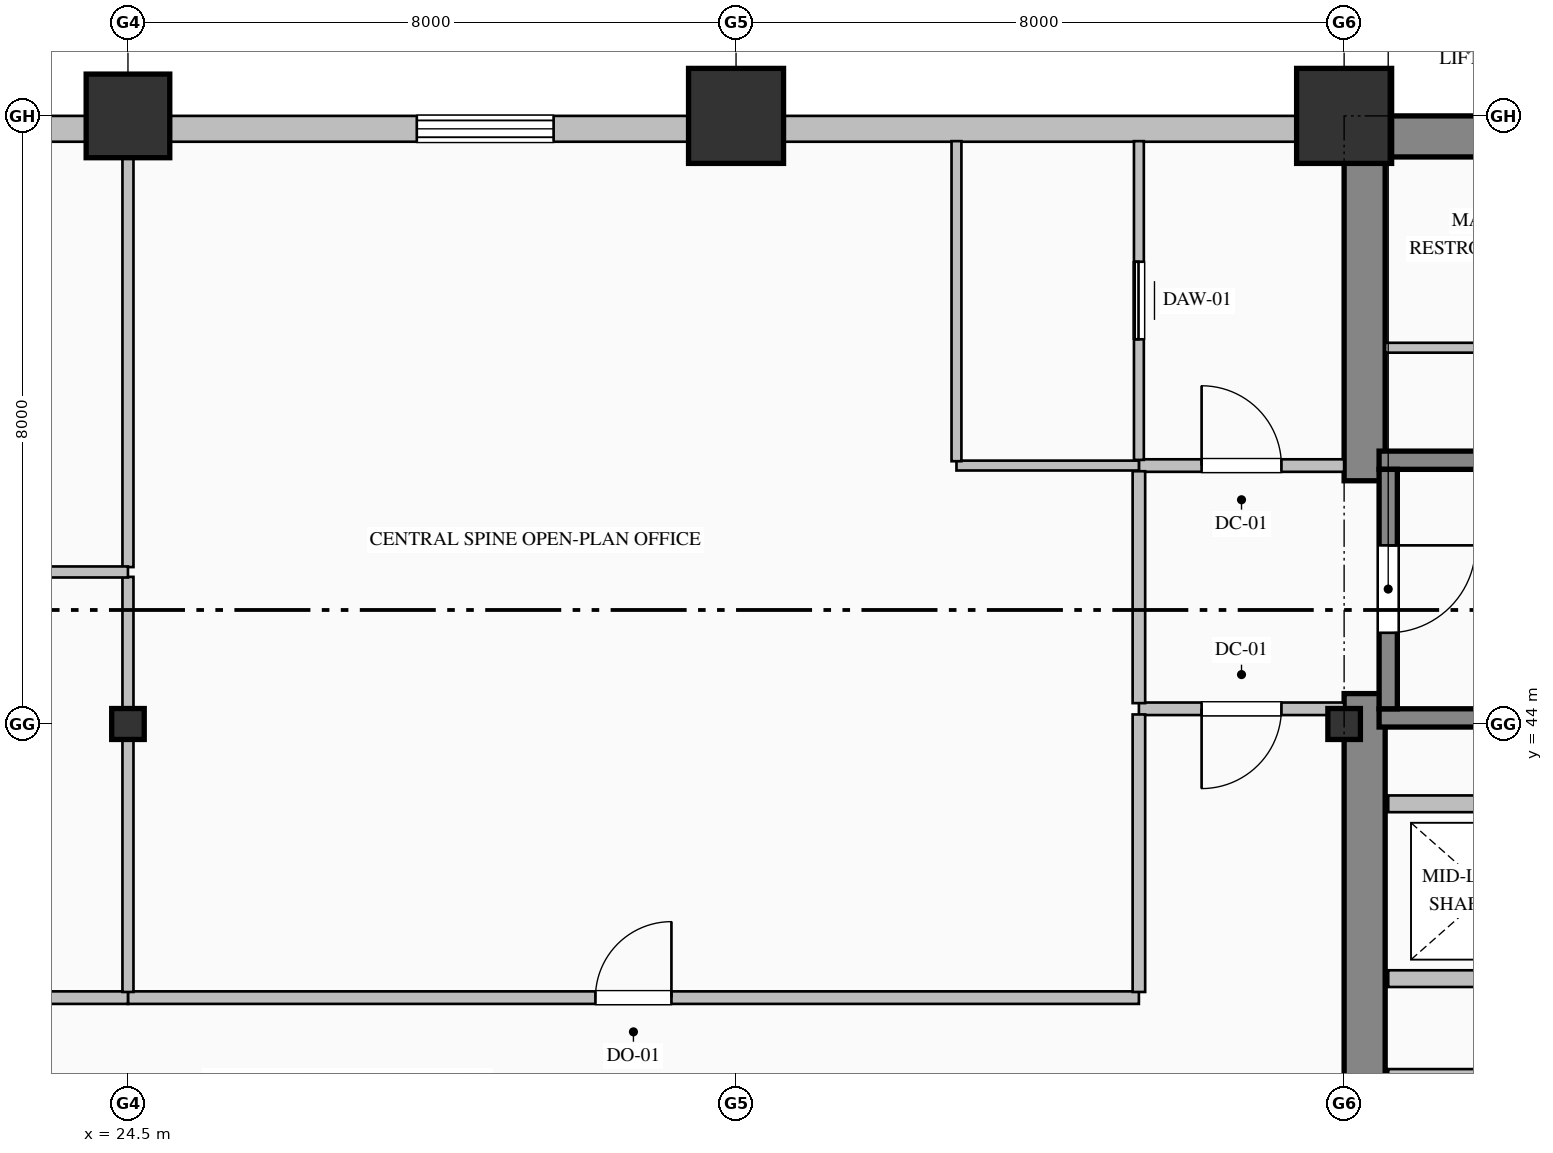
"""IFC4 building model, lengths in metres.
Left out: names, types, materials, properties, quantities, classifications, styles, units other than length and angle.
Written with IfcOpenShell. Run it as: python <this file> out.ifc"""

import sys

from ifc_helpers import new_model, si_unit, direction, frame, frame_2d, origin, origin_2d, place, context, subcontext, project, spatial, rectangle, hollow_rectangle, i_section, extrude, element, fill, save


model = new_model("IFC4")
c1 = context("Model", 3, precision=1e-05, world=origin(), true_north=direction((0.0, 1.0)))
c2 = subcontext(c1, "Body", "Model", "MODEL_VIEW")
j1 = project(units=[si_unit("LENGTHUNIT", "METRE"), si_unit("PLANEANGLEUNIT", "RADIAN")], contexts=[c1])
p1 = place(None, origin())
s1 = spatial("IfcSite", under=j1, at=p1, CompositionType="ELEMENT")
p2 = place(p1, origin())
s2 = spatial("IfcBuilding", under=s1, at=p2, CompositionType="ELEMENT")
p3 = place(p2, frame((0.0, 0.0, 68.2)))
s3 = spatial("IfcBuildingStorey", under=s2, at=p3, CompositionType="ELEMENT", Elevation=68.2)
p4 = place(p3, frame((40.5, 51.73, 0.0), z_axis=(0.0, 0.0, 1.0), x_axis=(1.0, 0.0, 0.0)))
e1 = element("IfcWall", 1, at=p4, inside=s3, PredefinedType="SHEAR", context=c2, shape_type="SweptSolid", body=[
    extrude(rectangle(XDim=23.5, YDim=0.54, at=frame_2d((11.75, 0.0))), origin(), (0.0, 0.0, 1.0), 3.75),
])
p5 = place(p3, frame((40.77, 36.54, 0.0), z_axis=(0.0, 0.0, 1.0), x_axis=(0.0, 1.0, 0.0)))
e2 = element("IfcWall", 2, at=p5, inside=s3, PredefinedType="SHEAR", context=c2, shape_type="SweptSolid", body=[
    extrude(rectangle(XDim=7.86, YDim=0.54, at=frame_2d((3.93, 0.0))), origin(), (0.0, 0.0, 1.0), 3.75),
])
p6 = place(p3, frame((40.77, 47.2, 0.0), z_axis=(0.0, 0.0, 1.0), x_axis=(0.0, 1.0, 0.0)))
e3 = element("IfcWall", 3, at=p6, inside=s3, PredefinedType="SHEAR", context=c2, shape_type="SweptSolid", body=[
    extrude(rectangle(XDim=4.26, YDim=0.54, at=frame_2d((2.13, 0.0))), origin(), (0.0, 0.0, 1.0), 3.75),
])
p7 = place(p3, frame((24.5, 44.0, 0.0), z_axis=(0.0, 0.0, 1.0), x_axis=(1.0, 0.0, 0.0)))
e4 = element("IfcColumn", 4, at=p7, inside=s3, PredefinedType="COLUMN", context=c2, shape_type="SweptSolid", body=[
    extrude(i_section(OverallWidth=0.407, OverallDepth=0.428, WebThickness=0.02, FlangeThickness=0.035, FilletRadius=0.022, at=origin_2d()), origin(), (0.0, 0.0, 1.0), 4.0),
])
p8 = place(p3, frame((24.5, 52.0, 0.0), z_axis=(0.0, 0.0, 1.0), x_axis=(1.0, 0.0, 0.0)))
e5 = element("IfcColumn", 5, at=p8, inside=s3, PredefinedType="COLUMN", context=c2, shape_type="SweptSolid", body=[
    extrude(hollow_rectangle(XDim=1.1, YDim=1.1, WallThickness=0.04, at=origin_2d()), origin(), (0.0, 0.0, 1.0), 4.0),
])
p9 = place(p3, frame((32.5, 52.0, 0.0), z_axis=(0.0, 0.0, 1.0), x_axis=(1.0, 0.0, 0.0)))
e6 = element("IfcColumn", 6, at=p9, inside=s3, PredefinedType="COLUMN", context=c2, shape_type="SweptSolid", body=[
    extrude(hollow_rectangle(XDim=1.25, YDim=1.25, WallThickness=0.045, at=origin_2d()), origin(), (0.0, 0.0, 1.0), 4.0),
])
p10 = place(p3, frame((40.5, 44.0, 0.0), z_axis=(0.0, 0.0, 1.0), x_axis=(1.0, 0.0, 0.0)))
e7 = element("IfcColumn", 7, at=p10, inside=s3, PredefinedType="COLUMN", context=c2, shape_type="SweptSolid", body=[
    extrude(i_section(OverallWidth=0.407, OverallDepth=0.428, WebThickness=0.02, FlangeThickness=0.035, FilletRadius=0.022, at=origin_2d()), origin(), (0.0, 0.0, 1.0), 4.0),
])
p11 = place(p3, frame((40.5, 52.0, 0.0), z_axis=(0.0, 0.0, 1.0), x_axis=(1.0, 0.0, 0.0)))
e8 = element("IfcColumn", 8, at=p11, inside=s3, PredefinedType="COLUMN", context=c2, shape_type="SweptSolid", body=[
    extrude(hollow_rectangle(XDim=1.25, YDim=1.25, WallThickness=0.045, at=origin_2d()), origin(), (0.0, 0.0, 1.0), 4.0),
])
p12 = place(p3, frame((4.0, 51.83, 0.0), z_axis=(0.0, 0.0, 1.0), x_axis=(1.0, 0.0, 0.0)))
e9 = element("IfcWall", 9, at=p12, inside=s3, PredefinedType="SOLIDWALL", context=c2, shape_type="SweptSolid", body=[
    extrude(rectangle(XDim=36.52, YDim=0.34, at=frame_2d((18.26, 0.0))), origin(), (0.0, 0.0, 1.0), 3.25),
])
p13 = place(p12, frame((6.15, 0.0, 0.85)))
e10 = element("IfcOpeningElement", 10, at=p13, cuts=e9, PredefinedType="OPENING", context=c2, shape_type="SweptSolid", body=[
    extrude(rectangle(XDim=2.1, YDim=2.05, at=frame_2d((1.05, 1.025))), frame((0.0, 0.18, 0.0), z_axis=(0.0, -1.0, 0.0), x_axis=(1.0, 0.0, 0.0)), (0.0, 0.0, 1.0), 0.36),
])
p14 = place(p12, frame((13.5, 0.0, 0.85)))
e11 = element("IfcOpeningElement", 11, at=p14, cuts=e9, PredefinedType="OPENING", context=c2, shape_type="SweptSolid", body=[
    extrude(rectangle(XDim=1.8, YDim=2.05, at=frame_2d((0.9, 1.025))), frame((0.0, 0.18, 0.0), z_axis=(0.0, -1.0, 0.0), x_axis=(1.0, 0.0, 0.0)), (0.0, 0.0, 1.0), 0.36),
])
p15 = place(p12, frame((16.95, 0.0, 0.85)))
e12 = element("IfcOpeningElement", 12, at=p15, cuts=e9, PredefinedType="OPENING", context=c2, shape_type="SweptSolid", body=[
    extrude(rectangle(XDim=2.1, YDim=2.05, at=frame_2d((1.05, 1.025))), frame((0.0, 0.18, 0.0), z_axis=(0.0, -1.0, 0.0), x_axis=(1.0, 0.0, 0.0)), (0.0, 0.0, 1.0), 0.36),
])
p16 = place(p12, frame((24.3, 0.0, 0.85)))
e13 = element("IfcOpeningElement", 13, at=p16, cuts=e9, PredefinedType="OPENING", context=c2, shape_type="SweptSolid", body=[
    extrude(rectangle(XDim=1.8, YDim=2.05, at=frame_2d((0.9, 1.025))), frame((0.0, 0.18, 0.0), z_axis=(0.0, -1.0, 0.0), x_axis=(1.0, 0.0, 0.0)), (0.0, 0.0, 1.0), 0.36),
])
for number, where, z_axis, x_axis in (
    (14, (40.96, 47.47, 0.0), (0.0, 0.0, 1.0), (1.0, 0.0, 0.0)),
    (15, (49.04, 44.08, 0.0), (0.0, 0.0, 1.0), (-1.0, 0.0, 0.0)),
):
    element("IfcWall", number, at=place(p3, frame(where, z_axis=z_axis, x_axis=x_axis)), inside=s3, PredefinedType="SOLIDWALL", context=c2, shape_type="SweptSolid", body=[
        extrude(rectangle(XDim=8.08, YDim=0.24, at=frame_2d((4.04, 0.0))), origin(), (0.0, 0.0, 1.0), 4.0),
    ])
p17 = place(p3, frame((41.08, 47.35, 0.0), z_axis=(0.0, 0.0, 1.0), x_axis=(0.0, -1.0, 0.0)))
e16 = element("IfcWall", 16, at=p17, inside=s3, PredefinedType="SOLIDWALL", context=c2, shape_type="SweptSolid", body=[
    extrude(rectangle(XDim=3.15, YDim=0.24, at=frame_2d((1.575, 0.0))), origin(), (0.0, 0.0, 1.0), 4.0),
])
p18 = place(p17, frame((1.0, 0.0, 0.0)))
e17 = element("IfcOpeningElement", 17, at=p18, cuts=e16, PredefinedType="OPENING", context=c2, shape_type="SweptSolid", body=[
    extrude(rectangle(XDim=1.15, YDim=2.2, at=frame_2d((0.575, 1.1))), frame((0.0, 0.13, 0.0), z_axis=(0.0, -1.0, 0.0), x_axis=(1.0, 0.0, 0.0)), (0.0, 0.0, 1.0), 0.26),
])
for number, where, z_axis, x_axis in (
    (18, (41.08, 39.35, 0.0), (0.0, 0.0, 1.0), (1.0, 0.0, 0.0)),
    (19, (49.32, 40.65, 0.0), (0.0, 0.0, 1.0), (-1.0, 0.0, 0.0)),
    (20, (41.08, 42.95, 0.0), (0.0, 0.0, 1.0), (1.0, 0.0, 0.0)),
):
    element("IfcWall", number, at=place(p3, frame(where, z_axis=z_axis, x_axis=x_axis)), inside=s3, PredefinedType="PARTITIONING", context=c2, shape_type="SweptSolid", body=[
        extrude(rectangle(XDim=8.24, YDim=0.22, at=frame_2d((4.12, 0.0))), origin(), (0.0, 0.0, 1.0), 3.75),
    ])
p19 = place(p3, frame((37.8, 47.4, 0.0), z_axis=(0.0, 0.0, 1.0), x_axis=(1.0, 0.0, 0.0)))
e21 = element("IfcWall", 21, at=p19, inside=s3, PredefinedType="PARTITIONING", context=c2, shape_type="SweptSolid", body=[
    extrude(rectangle(XDim=2.7, YDim=0.165, at=frame_2d((1.35, 0.0))), origin(), (0.0, 0.0, 1.0), 3.75),
])
p20 = place(p19, frame((0.825, 0.0, 0.0)))
e22 = element("IfcOpeningElement", 22, at=p20, cuts=e21, PredefinedType="OPENING", context=c2, shape_type="SweptSolid", body=[
    extrude(rectangle(XDim=1.05, YDim=2.15, at=frame_2d((0.525, 1.075))), frame((0.0, 0.093, 0.0), z_axis=(0.0, -1.0, 0.0), x_axis=(1.0, 0.0, 0.0)), (0.0, 0.0, 1.0), 0.185),
])
p21 = place(p3, frame((40.5, 44.2, 0.0), z_axis=(0.0, 0.0, 1.0), x_axis=(-1.0, 0.0, 0.0)))
e23 = element("IfcWall", 23, at=p21, inside=s3, PredefinedType="PARTITIONING", context=c2, shape_type="SweptSolid", body=[
    extrude(rectangle(XDim=2.7, YDim=0.165, at=frame_2d((1.35, 0.0))), origin(), (0.0, 0.0, 1.0), 3.75),
])
p22 = place(p21, frame((0.825, 0.0, 0.0)))
e24 = element("IfcOpeningElement", 24, at=p22, cuts=e23, PredefinedType="OPENING", context=c2, shape_type="SweptSolid", body=[
    extrude(rectangle(XDim=1.05, YDim=2.15, at=frame_2d((0.525, 1.075))), frame((0.0, 0.093, 0.0), z_axis=(0.0, -1.0, 0.0), x_axis=(1.0, 0.0, 0.0)), (0.0, 0.0, 1.0), 0.185),
])
p23 = place(p3, frame((37.8, 44.274, 0.0), z_axis=(0.0, 0.0, 1.0), x_axis=(0.0, 1.0, 0.0)))
e25 = element("IfcWall", 25, at=p23, inside=s3, PredefinedType="PARTITIONING", context=c2, shape_type="SweptSolid", body=[
    extrude(rectangle(XDim=3.051, YDim=0.165, at=frame_2d((1.525, 0.0))), origin(), (0.0, 0.0, 1.0), 3.75),
])
p24 = place(p3, frame((37.8, 47.475, 0.0), z_axis=(0.0, 0.0, 1.0), x_axis=(0.0, 1.0, 0.0)))
e26 = element("IfcWall", 26, at=p24, inside=s3, PredefinedType="PARTITIONING", context=c2, shape_type="SweptSolid", body=[
    extrude(rectangle(XDim=4.193, YDim=0.13, at=frame_2d((2.097, 0.0))), origin(), (0.0, 0.0, 1.0), 3.75),
])
p25 = place(p24, frame((1.587, 0.0, 0.0)))
e27 = element("IfcOpeningElement", 27, at=p25, cuts=e26, PredefinedType="OPENING", context=c2, shape_type="SweptSolid", body=[
    extrude(rectangle(XDim=1.02, YDim=2.15, at=frame_2d((0.51, 1.075))), frame((0.0, 0.075, 0.0), z_axis=(0.0, -1.0, 0.0), x_axis=(1.0, 0.0, 0.0)), (0.0, 0.0, 1.0), 0.15),
])
p26 = place(p3, frame((37.8, 47.4, 0.0), z_axis=(0.0, 0.0, 1.0), x_axis=(-1.0, 0.0, 0.0)))
e28 = element("IfcWall", 28, at=p26, inside=s3, PredefinedType="PARTITIONING", context=c2, shape_type="SweptSolid", body=[
    extrude(rectangle(XDim=2.4, YDim=0.13, at=frame_2d((1.2, 0.0))), origin(), (0.0, 0.0, 1.0), 3.75),
])
p27 = place(p3, frame((35.4, 47.457, 0.0), z_axis=(0.0, 0.0, 1.0), x_axis=(0.0, 1.0, 0.0)))
e29 = element("IfcWall", 29, at=p27, inside=s3, PredefinedType="PARTITIONING", context=c2, shape_type="SweptSolid", body=[
    extrude(rectangle(XDim=4.211, YDim=0.13, at=frame_2d((2.105, 0.0))), origin(), (0.0, 0.0, 1.0), 3.75),
])
p28 = place(p3, frame((41.04, 48.95, 0.0), z_axis=(0.0, 0.0, 1.0), x_axis=(1.0, 0.0, 0.0)))
e30 = element("IfcWall", 30, at=p28, inside=s3, PredefinedType="PARTITIONING", context=c2, shape_type="SweptSolid", body=[
    extrude(rectangle(XDim=4.16, YDim=0.13, at=frame_2d((2.08, 0.0))), origin(), (0.0, 0.0, 1.0), 3.75),
])
p29 = place(p28, frame((1.62, 0.0, 0.0)))
e31 = element("IfcOpeningElement", 31, at=p29, cuts=e30, PredefinedType="OPENING", context=c2, shape_type="SweptSolid", body=[
    extrude(rectangle(XDim=0.92, YDim=2.15, at=frame_2d((0.46, 1.075))), frame((0.0, 0.075, 0.0), z_axis=(0.0, -1.0, 0.0), x_axis=(1.0, 0.0, 0.0)), (0.0, 0.0, 1.0), 0.15),
])
p30 = place(p3, frame((24.5, 40.4, 0.0), z_axis=(0.0, 0.0, 1.0), x_axis=(1.0, 0.0, 0.0)))
e32 = element("IfcWall", 32, at=p30, inside=s3, PredefinedType="PARTITIONING", context=c2, shape_type="SweptSolid", body=[
    extrude(rectangle(XDim=13.3, YDim=0.165, at=frame_2d((6.65, 0.0))), origin(), (0.0, 0.0, 1.0), 3.75),
])
p31 = place(p30, frame((6.15, 0.0, 0.0)))
e33 = element("IfcOpeningElement", 33, at=p31, cuts=e32, PredefinedType="OPENING", context=c2, shape_type="SweptSolid", body=[
    extrude(rectangle(XDim=1.0, YDim=2.15, at=frame_2d((0.5, 1.075))), frame((0.0, 0.093, 0.0), z_axis=(0.0, -1.0, 0.0), x_axis=(1.0, 0.0, 0.0)), (0.0, 0.0, 1.0), 0.185),
])
p32 = place(p3, frame((9.0, 40.4, 0.0), z_axis=(0.0, 0.0, 1.0), x_axis=(1.0, 0.0, 0.0)))
e34 = element("IfcWall", 34, at=p32, inside=s3, PredefinedType="PARTITIONING", context=c2, shape_type="SweptSolid", body=[
    extrude(rectangle(XDim=15.5, YDim=0.165, at=frame_2d((7.75, 0.0))), origin(), (0.0, 0.0, 1.0), 3.75),
])
p33 = place(p32, frame((7.25, 0.0, 0.0)))
e35 = element("IfcOpeningElement", 35, at=p33, cuts=e34, PredefinedType="OPENING", context=c2, shape_type="SweptSolid", body=[
    extrude(rectangle(XDim=1.0, YDim=2.15, at=frame_2d((0.5, 1.075))), frame((0.0, 0.093, 0.0), z_axis=(0.0, -1.0, 0.0), x_axis=(1.0, 0.0, 0.0)), (0.0, 0.0, 1.0), 0.185),
])
p34 = place(p3, frame((37.8, 40.475, 0.0), z_axis=(0.0, 0.0, 1.0), x_axis=(0.0, 1.0, 0.0)))
e36 = element("IfcWall", 36, at=p34, inside=s3, PredefinedType="PARTITIONING", context=c2, shape_type="SweptSolid", body=[
    extrude(rectangle(XDim=3.651, YDim=0.165, at=frame_2d((1.825, 0.0))), origin(), (0.0, 0.0, 1.0), 3.75),
])
p35 = place(p3, frame((24.5, 40.475, 0.0), z_axis=(0.0, 0.0, 1.0), x_axis=(0.0, 1.0, 0.0)))
e37 = element("IfcWall", 37, at=p35, inside=s3, PredefinedType="PARTITIONING", context=c2, shape_type="SweptSolid", body=[
    extrude(rectangle(XDim=5.461, YDim=0.145, at=frame_2d((2.73, 0.0))), origin(), (0.0, 0.0, 1.0), 3.042),
])
p36 = place(p3, frame((24.5, 46.064, 0.0), z_axis=(0.0, 0.0, 1.0), x_axis=(0.0, 1.0, 0.0)))
e38 = element("IfcWall", 38, at=p36, inside=s3, PredefinedType="PARTITIONING", context=c2, shape_type="SweptSolid", body=[
    extrude(rectangle(XDim=5.604, YDim=0.145, at=frame_2d((2.802, 0.0))), origin(), (0.0, 0.0, 1.0), 3.042),
])
p37 = place(p3, frame((0.332, 46.0, 0.0), z_axis=(0.0, 0.0, 1.0), x_axis=(1.0, 0.0, 0.0)))
e39 = element("IfcWall", 39, at=p37, inside=s3, PredefinedType="PARTITIONING", context=c2, shape_type="SweptSolid", body=[
    extrude(rectangle(XDim=24.168, YDim=0.145, at=frame_2d((12.084, 0.0))), origin(), (0.0, 0.0, 1.0), 3.75),
])
p38 = place(p37, frame((11.584, 0.0, 0.0)))
e40 = element("IfcOpeningElement", 40, at=p38, cuts=e39, PredefinedType="OPENING", context=c2, shape_type="SweptSolid", body=[
    extrude(rectangle(XDim=1.0, YDim=2.15, at=frame_2d((0.5, 1.075))), frame((0.0, 0.083, 0.0), z_axis=(0.0, -1.0, 0.0), x_axis=(1.0, 0.0, 0.0)), (0.0, 0.0, 1.0), 0.165),
])
p39 = place(p16, origin())
e41 = element("IfcWindow", 41, at=p39, inside=s3, PartitioningType="TRIPLE_PANEL_VERTICAL", PredefinedType="WINDOW", context=c2, shape_type="SweptSolid", body=[
    extrude(rectangle(XDim=1.8, YDim=2.05, at=frame_2d((0.9, 1.025))), frame((0.0, 0.15, 0.0), z_axis=(0.0, -1.0, 0.0), x_axis=(1.0, 0.0, 0.0)), (0.0, 0.0, 1.0), 0.06),
])
fill(e13, e41)
p40 = place(p18, origin())
e42 = element("IfcDoor", 42, at=p40, inside=s3, OperationType="SINGLE_SWING_LEFT", PredefinedType="DOOR", context=c2, shape_type="SweptSolid", body=[
    extrude(rectangle(XDim=1.15, YDim=2.2, at=frame_2d((0.575, 1.1))), frame((0.0, 0.025, 0.0), z_axis=(0.0, -1.0, 0.0), x_axis=(1.0, 0.0, 0.0)), (0.0, 0.0, 1.0), 0.05),
])
fill(e17, e42)
p41 = place(p20, origin())
e43 = element("IfcDoor", 43, at=p41, inside=s3, OperationType="SINGLE_SWING_LEFT", PredefinedType="DOOR", context=c2, shape_type="SweptSolid", body=[
    extrude(rectangle(XDim=1.05, YDim=2.15, at=frame_2d((0.525, 1.075))), frame((0.0, 0.025, 0.0), z_axis=(0.0, -1.0, 0.0), x_axis=(1.0, 0.0, 0.0)), (0.0, 0.0, 1.0), 0.05),
])
fill(e22, e43)
p42 = place(p22, origin())
e44 = element("IfcDoor", 44, at=p42, inside=s3, OperationType="SINGLE_SWING_RIGHT", PredefinedType="DOOR", context=c2, shape_type="SweptSolid", body=[
    extrude(rectangle(XDim=1.05, YDim=2.15, at=frame_2d((0.525, 1.075))), frame((0.0, 0.025, 0.0), z_axis=(0.0, -1.0, 0.0), x_axis=(1.0, 0.0, 0.0)), (0.0, 0.0, 1.0), 0.05),
])
fill(e24, e44)
p43 = place(p25, origin())
e45 = element("IfcDoor", 45, at=p43, inside=s3, OperationType="SLIDING_TO_LEFT", PredefinedType="DOOR", context=c2, shape_type="SweptSolid", body=[
    extrude(rectangle(XDim=1.02, YDim=2.15, at=frame_2d((0.51, 1.075))), frame((0.0, 0.025, 0.0), z_axis=(0.0, -1.0, 0.0), x_axis=(1.0, 0.0, 0.0)), (0.0, 0.0, 1.0), 0.05),
])
fill(e27, e45)
p44 = place(p31, origin())
e46 = element("IfcDoor", 46, at=p44, inside=s3, OperationType="SINGLE_SWING_RIGHT", PredefinedType="DOOR", context=c2, shape_type="SweptSolid", body=[
    extrude(rectangle(XDim=1.0, YDim=2.15, at=frame_2d((0.5, 1.075))), frame((0.0, 0.025, 0.0), z_axis=(0.0, -1.0, 0.0), x_axis=(1.0, 0.0, 0.0)), (0.0, 0.0, 1.0), 0.05),
])
fill(e33, e46)
save(model, sys.argv[1])
